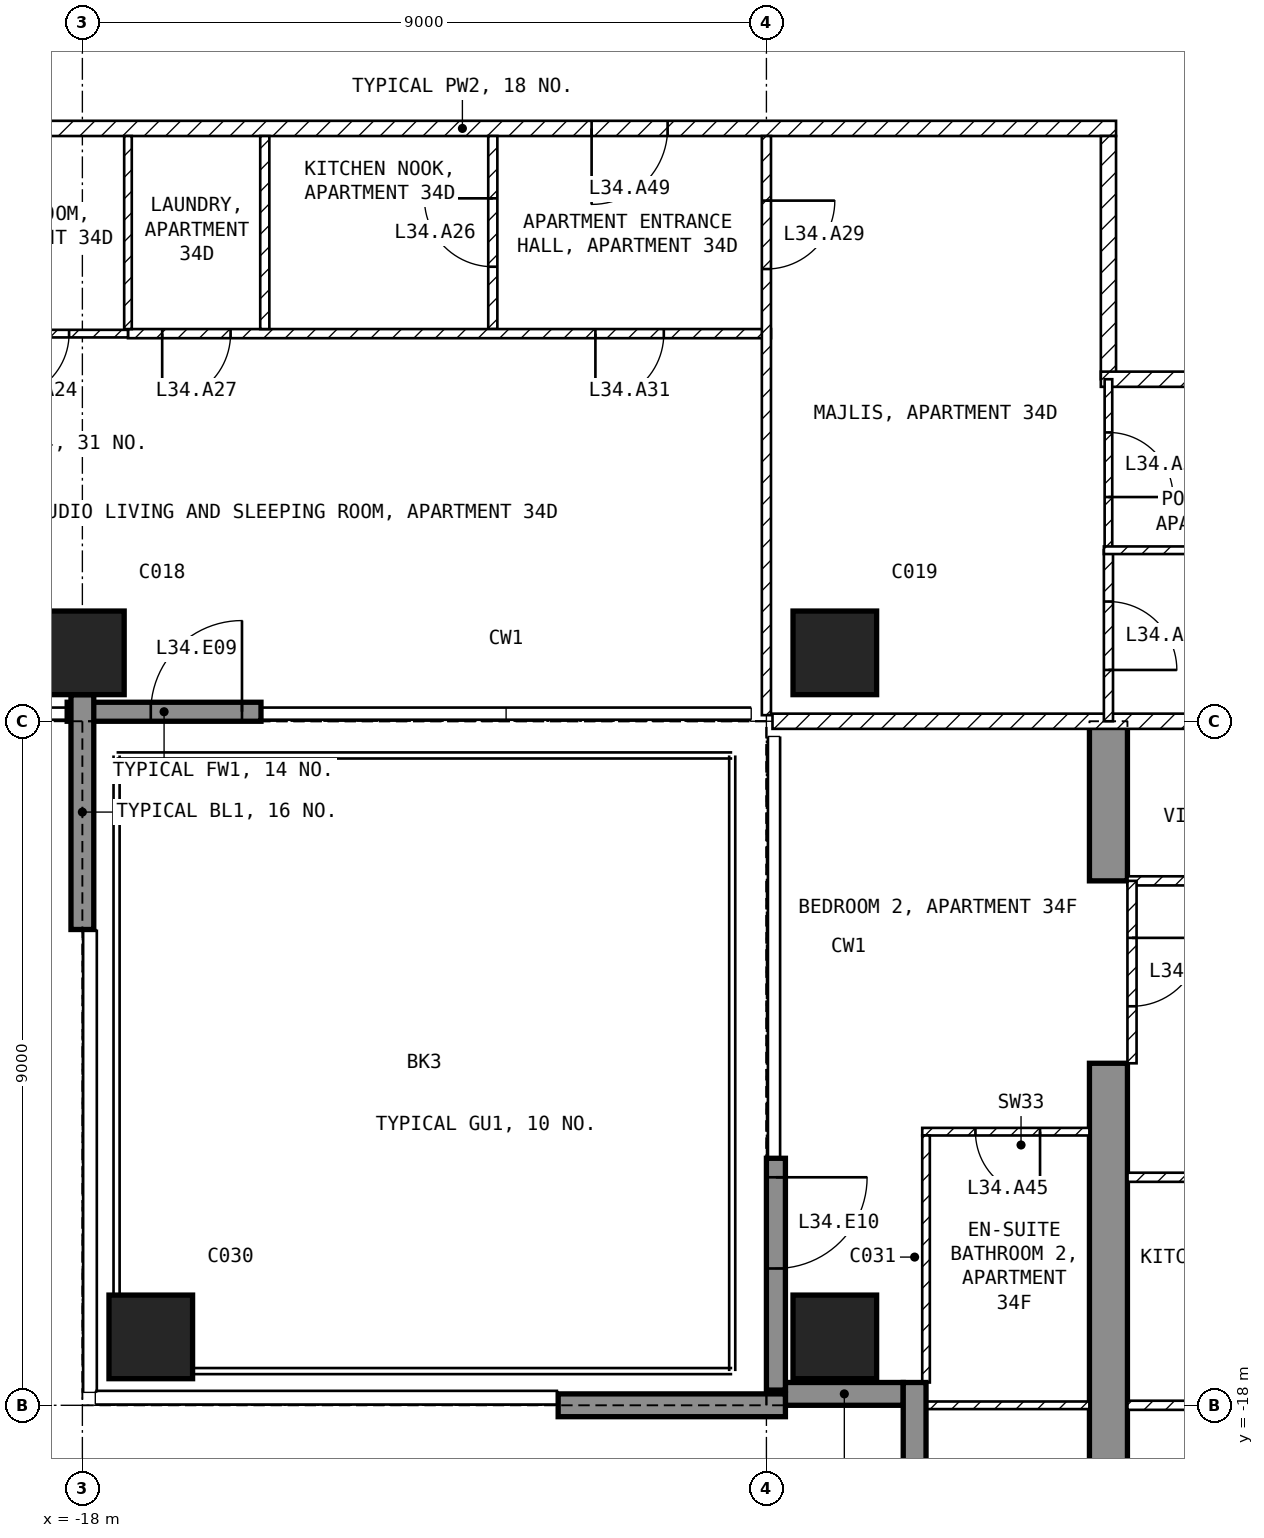
"""IFC4 building model, lengths in metres.
Left out: names, types, materials, properties, quantities, classifications, styles, units other than length and angle.
Written with IfcOpenShell. Run it as: python <this file> out.ifc"""

import sys

from ifc_helpers import new_model, si_unit, direction, frame, frame_2d, origin, origin_2d, place, context, subcontext, project, spatial, polyline, rectangle, outline, extrude, element, fill, save


model = new_model("IFC4")
c1 = context("Model", 3, precision=1e-05, world=origin(), true_north=direction((0.0, 1.0)))
c2 = subcontext(c1, "Body", "Model", "MODEL_VIEW")
j1 = project(units=[si_unit("LENGTHUNIT", "METRE"), si_unit("PLANEANGLEUNIT", "RADIAN")], contexts=[c1])
p1 = place(None, origin())
s1 = spatial("IfcSite", under=j1, at=p1, CompositionType="ELEMENT")
p2 = place(p1, origin())
s2 = spatial("IfcBuilding", under=s1, at=p2, CompositionType="ELEMENT")
p3 = place(p2, frame((0.0, 0.0, 140.9)))
s3 = spatial("IfcBuildingStorey", under=s2, at=p3, CompositionType="ELEMENT", Elevation=140.9)
for number, where, z_axis, x_axis in (
    (1, (-18.0, -8.1, -0.25), (0.0, 0.0, 1.0), (1.0, 0.0, 0.0)),
    (2, (-8.1, -17.1, -0.25), (0.0, 0.0, 1.0), (1.0, 0.0, 0.0)),
    (3, (-8.1, -8.1, -0.25), (0.0, 0.0, 1.0), (1.0, 0.0, 0.0)),
    (4, (-17.1, -17.1, -0.25), (0.0, 0.0, 1.0), (1.0, 0.0, 0.0)),
):
    element("IfcColumn", number, at=place(p3, frame(where, z_axis=z_axis, x_axis=x_axis)), inside=s3, PredefinedType="COLUMN", context=c2, shape_type="SweptSolid", body=[
        extrude(rectangle(XDim=1.1, YDim=1.1, at=origin_2d()), origin(), (0.0, 0.0, 1.0), 3.5),
    ])
p4 = place(p3, frame((-4.75, -20.15, -0.25), z_axis=(1.0, 0.0, 0.0), x_axis=(0.0, 1.0, 0.0)))
e5 = element("IfcWall", 5, at=p4, inside=s3, PredefinedType="SHEAR", context=c2, shape_type="SweptSolid", body=[
    extrude(outline(polyline([(0.0, 0.0), (6.65, 0.0), (6.65, 2.65), (9.05, 2.65), (9.05, 0.0), (11.15, 0.0), (11.15, 3.5), (0.0, 3.5), (0.0, 0.0)])), origin(), (0.0, 0.0, 1.0), 0.5),
])
p5 = place(p3, frame((-18.2, -8.875, 0.0), z_axis=(0.0, 0.0, 1.0), x_axis=(1.0, 0.0, 0.0)))
e6 = element("IfcWall", 6, at=p5, inside=s3, PredefinedType="SOLIDWALL", context=c2, shape_type="SweptSolid", body=[
    extrude(rectangle(XDim=2.55, YDim=0.25, at=frame_2d((1.275, 0.0))), origin(), (0.0, 0.0, 1.0), 3.25),
])
p6 = place(p5, frame((1.1, 0.0, 0.0)))
e7 = element("IfcOpeningElement", 7, at=p6, cuts=e6, PredefinedType="OPENING", context=c2, shape_type="SweptSolid", body=[
    extrude(rectangle(XDim=1.2, YDim=2.4, at=frame_2d((0.6, 1.2))), frame((0.0, 0.135, 0.0), z_axis=(0.0, -1.0, 0.0), x_axis=(1.0, 0.0, 0.0)), (0.0, 0.0, 1.0), 0.27),
])
p7 = place(p3, frame((-8.875, -14.75, 0.0), z_axis=(0.0, 0.0, 1.0), x_axis=(0.0, -1.0, 0.0)))
e8 = element("IfcWall", 8, at=p7, inside=s3, PredefinedType="SOLIDWALL", context=c2, shape_type="SweptSolid", body=[
    extrude(rectangle(XDim=3.05, YDim=0.25, at=frame_2d((1.525, 0.0))), origin(), (0.0, 0.0, 1.0), 3.25),
])
p8 = place(p7, frame((0.25, 0.0, 0.0)))
e9 = element("IfcOpeningElement", 9, at=p8, cuts=e8, PredefinedType="OPENING", context=c2, shape_type="SweptSolid", body=[
    extrude(rectangle(XDim=1.2, YDim=2.4, at=frame_2d((0.6, 1.2))), frame((0.0, 0.135, 0.0), z_axis=(0.0, -1.0, 0.0), x_axis=(1.0, 0.0, 0.0)), (0.0, 0.0, 1.0), 0.27),
])
p9 = place(p3, frame((-8.75, -17.85, 0.0), z_axis=(0.0, 0.0, 1.0), x_axis=(1.0, 0.0, 0.0)))
e10 = element("IfcWall", 10, at=p9, inside=s3, PredefinedType="SOLIDWALL", context=c2, shape_type="SweptSolid", body=[
    extrude(rectangle(XDim=1.55, YDim=0.3, at=frame_2d((0.775, 0.0))), origin(), (0.0, 0.0, 1.0), 3.25),
])
p10 = place(p3, frame((-7.05, -17.7, 0.0), z_axis=(0.0, 0.0, 1.0), x_axis=(0.0, -1.0, 0.0)))
e11 = element("IfcWall", 11, at=p10, inside=s3, PredefinedType="SOLIDWALL", context=c2, shape_type="SweptSolid", body=[
    extrude(rectangle(XDim=1.8, YDim=0.3, at=frame_2d((0.9, 0.0))), origin(), (0.0, 0.0, 1.0), 3.25),
])
p11 = place(p3, frame((-18.0, -8.65, 0.0), z_axis=(0.0, 0.0, 1.0), x_axis=(0.0, -1.0, 0.0)))
e12 = element("IfcWall", 12, at=p11, inside=s3, PredefinedType="SOLIDWALL", context=c2, shape_type="SweptSolid", body=[
    extrude(rectangle(XDim=3.09, YDim=0.3, at=frame_2d((1.545, 0.0))), origin(), (0.0, 0.0, 1.0), 3.25),
])
p12 = place(p3, frame((-8.75, -18.0, 0.0), z_axis=(0.0, 0.0, 1.0), x_axis=(-1.0, 0.0, 0.0)))
e13 = element("IfcWall", 13, at=p12, inside=s3, PredefinedType="SOLIDWALL", context=c2, shape_type="SweptSolid", body=[
    extrude(rectangle(XDim=2.99, YDim=0.3, at=frame_2d((1.495, 0.0))), origin(), (0.0, 0.0, 1.0), 3.25),
])
p13 = place(p3, frame((-4.4, -1.2, 0.0), z_axis=(0.0, 0.0, 1.0), x_axis=(-1.0, 0.0, 0.0)))
e14 = element("IfcWall", 14, at=p13, inside=s3, PredefinedType="PARTITIONING", context=c2, shape_type="SweptSolid", body=[
    extrude(rectangle(XDim=17.2, YDim=0.2, at=frame_2d((8.6, 0.0))), origin(), (0.0, 0.0, 1.0), 3.25),
])
p14 = place(p13, frame((5.9, 0.0, 0.0)))
e15 = element("IfcOpeningElement", 15, at=p14, cuts=e14, PredefinedType="OPENING", context=c2, shape_type="SweptSolid", body=[
    extrude(rectangle(XDim=1.0, YDim=2.1, at=frame_2d((0.5, 1.05))), frame((0.0, 0.11, 0.0), z_axis=(0.0, -1.0, 0.0), x_axis=(1.0, 0.0, 0.0)), (0.0, 0.0, 1.0), 0.22),
])
p15 = place(p3, frame((-4.5, -4.5, 0.0), z_axis=(0.0, 0.0, 1.0), x_axis=(0.0, 1.0, 0.0)))
e16 = element("IfcWall", 16, at=p15, inside=s3, PredefinedType="PARTITIONING", context=c2, shape_type="SweptSolid", body=[
    extrude(rectangle(XDim=3.2, YDim=0.2, at=frame_2d((1.6, 0.0))), origin(), (0.0, 0.0, 1.0), 3.25),
])
p16 = place(p3, frame((-1.1, -4.5, 0.0), z_axis=(0.0, 0.0, 1.0), x_axis=(-1.0, 0.0, 0.0)))
e17 = element("IfcWall", 17, at=p16, inside=s3, PredefinedType="PARTITIONING", context=c2, shape_type="SweptSolid", body=[
    extrude(rectangle(XDim=3.5, YDim=0.2, at=frame_2d((1.75, 0.0))), origin(), (0.0, 0.0, 1.0), 3.25),
])
p17 = place(p3, frame((8.92, -9.0, 0.0), z_axis=(0.0, 0.0, 1.0), x_axis=(-1.0, 0.0, 0.0)))
e18 = element("IfcWall", 18, at=p17, inside=s3, PredefinedType="PARTITIONING", context=c2, shape_type="SweptSolid", body=[
    extrude(rectangle(XDim=17.84, YDim=0.2, at=frame_2d((8.92, 0.0))), origin(), (0.0, 0.0, 1.0), 3.25),
])
p18 = place(p17, frame((8.42, 0.0, 0.0)))
e19 = element("IfcOpeningElement", 19, at=p18, cuts=e18, PredefinedType="OPENING", context=c2, shape_type="SweptSolid", body=[
    extrude(rectangle(XDim=1.0, YDim=2.1, at=frame_2d((0.5, 1.05))), frame((0.0, 0.11, 0.0), z_axis=(0.0, -1.0, 0.0), x_axis=(1.0, 0.0, 0.0)), (0.0, 0.0, 1.0), 0.22),
])
p19 = place(p3, frame((-12.6, -3.84, 0.0), z_axis=(0.0, 0.0, 1.0), x_axis=(0.0, 1.0, 0.0)))
e20 = element("IfcWall", 20, at=p19, inside=s3, PredefinedType="PARTITIONING", context=c2, shape_type="SweptSolid", body=[
    extrude(rectangle(XDim=2.54, YDim=0.12, at=frame_2d((1.27, 0.0))), origin(), (0.0, 0.0, 1.0), 3.25),
])
p20 = place(p19, frame((0.82, 0.0, 0.0)))
e21 = element("IfcOpeningElement", 21, at=p20, cuts=e20, PredefinedType="OPENING", context=c2, shape_type="SweptSolid", body=[
    extrude(rectangle(XDim=0.9, YDim=2.1, at=frame_2d((0.45, 1.05))), frame((0.0, 0.07, 0.0), z_axis=(0.0, -1.0, 0.0), x_axis=(1.0, 0.0, 0.0)), (0.0, 0.0, 1.0), 0.14),
])
p21 = place(p3, frame((-8.94, -3.9, 0.0), z_axis=(0.0, 0.0, 1.0), x_axis=(-1.0, 0.0, 0.0)))
e22 = element("IfcWall", 22, at=p21, inside=s3, PredefinedType="PARTITIONING", context=c2, shape_type="SweptSolid", body=[
    extrude(rectangle(XDim=8.46, YDim=0.12, at=frame_2d((4.23, 0.0))), origin(), (0.0, 0.0, 1.0), 3.25),
])
p22 = place(p21, frame((7.11, 0.0, 0.0)))
e23 = element("IfcOpeningElement", 23, at=p22, cuts=e22, PredefinedType="OPENING", context=c2, shape_type="SweptSolid", body=[
    extrude(rectangle(XDim=0.9, YDim=2.1, at=frame_2d((0.45, 1.05))), frame((0.0, 0.07, 0.0), z_axis=(0.0, -1.0, 0.0), x_axis=(1.0, 0.0, 0.0)), (0.0, 0.0, 1.0), 0.14),
])
p23 = place(p21, frame((1.41, 0.0, 0.0)))
e24 = element("IfcOpeningElement", 24, at=p23, cuts=e22, PredefinedType="OPENING", context=c2, shape_type="SweptSolid", body=[
    extrude(rectangle(XDim=0.9, YDim=2.1, at=frame_2d((0.45, 1.05))), frame((0.0, 0.07, 0.0), z_axis=(0.0, -1.0, 0.0), x_axis=(1.0, 0.0, 0.0)), (0.0, 0.0, 1.0), 0.14),
])
p24 = place(p3, frame((-9.0, -1.3, 0.0), z_axis=(0.0, 0.0, 1.0), x_axis=(0.0, -1.0, 0.0)))
e25 = element("IfcWall", 25, at=p24, inside=s3, PredefinedType="PARTITIONING", context=c2, shape_type="SweptSolid", body=[
    extrude(rectangle(XDim=7.62, YDim=0.12, at=frame_2d((3.81, 0.0))), origin(), (0.0, 0.0, 1.0), 3.25),
])
p25 = place(p24, frame((0.85, 0.0, 0.0)))
e26 = element("IfcOpeningElement", 26, at=p25, cuts=e25, PredefinedType="OPENING", context=c2, shape_type="SweptSolid", body=[
    extrude(rectangle(XDim=0.9, YDim=2.1, at=frame_2d((0.45, 1.05))), frame((0.0, 0.07, 0.0), z_axis=(0.0, -1.0, 0.0), x_axis=(1.0, 0.0, 0.0)), (0.0, 0.0, 1.0), 0.14),
])
p26 = place(p3, frame((-15.6, -3.84, 0.0), z_axis=(0.0, 0.0, 1.0), x_axis=(0.0, 1.0, 0.0)))
e27 = element("IfcWall", 27, at=p26, inside=s3, PredefinedType="PARTITIONING", context=c2, shape_type="SweptSolid", body=[
    extrude(rectangle(XDim=2.54, YDim=0.12, at=frame_2d((1.27, 0.0))), origin(), (0.0, 0.0, 1.0), 3.25),
])
p27 = place(p3, frame((-17.4, -3.84, 0.0), z_axis=(0.0, 0.0, 1.0), x_axis=(0.0, 1.0, 0.0)))
e28 = element("IfcWall", 28, at=p27, inside=s3, PredefinedType="PARTITIONING", context=c2, shape_type="SweptSolid", body=[
    extrude(rectangle(XDim=2.54, YDim=0.1, at=frame_2d((1.27, 0.0))), origin(), (0.0, 0.0, 1.0), 3.25),
])
p28 = place(p3, frame((-17.4, -3.9, 0.0), z_axis=(0.0, 0.0, 1.0), x_axis=(-1.0, 0.0, 0.0)))
e29 = element("IfcWall", 29, at=p28, inside=s3, PredefinedType="PARTITIONING", context=c2, shape_type="SweptSolid", body=[
    extrude(rectangle(XDim=2.4, YDim=0.1, at=frame_2d((1.2, 0.0))), origin(), (0.0, 0.0, 1.0), 3.25),
])
p29 = place(p28, frame((0.775, 0.0, 0.0)))
e30 = element("IfcOpeningElement", 30, at=p29, cuts=e29, PredefinedType="OPENING", context=c2, shape_type="SweptSolid", body=[
    extrude(rectangle(XDim=0.85, YDim=2.1, at=frame_2d((0.425, 1.05))), frame((0.0, 0.06, 0.0), z_axis=(0.0, -1.0, 0.0), x_axis=(1.0, 0.0, 0.0)), (0.0, 0.0, 1.0), 0.12),
])
p30 = place(p3, frame((-4.5, -4.5, 0.0), z_axis=(0.0, 0.0, 1.0), x_axis=(0.0, -1.0, 0.0)))
e31 = element("IfcWall", 31, at=p30, inside=s3, PredefinedType="PARTITIONING", context=c2, shape_type="SweptSolid", body=[
    extrude(rectangle(XDim=2.25, YDim=0.1, at=frame_2d((1.125, 0.0))), origin(), (0.0, 0.0, 1.0), 3.25),
])
p31 = place(p30, frame((0.7, 0.0, 0.0)))
e32 = element("IfcOpeningElement", 32, at=p31, cuts=e31, PredefinedType="OPENING", context=c2, shape_type="SweptSolid", body=[
    extrude(rectangle(XDim=0.85, YDim=2.1, at=frame_2d((0.425, 1.05))), frame((0.0, 0.06, 0.0), z_axis=(0.0, -1.0, 0.0), x_axis=(1.0, 0.0, 0.0)), (0.0, 0.0, 1.0), 0.12),
])
p32 = place(p3, frame((-4.5, -6.75, 0.0), z_axis=(0.0, 0.0, 1.0), x_axis=(0.0, -1.0, 0.0)))
e33 = element("IfcWall", 33, at=p32, inside=s3, PredefinedType="PARTITIONING", context=c2, shape_type="SweptSolid", body=[
    extrude(rectangle(XDim=2.25, YDim=0.12, at=frame_2d((1.125, 0.0))), origin(), (0.0, 0.0, 1.0), 3.25),
])
p33 = place(p32, frame((0.675, 0.0, 0.0)))
e34 = element("IfcOpeningElement", 34, at=p33, cuts=e33, PredefinedType="OPENING", context=c2, shape_type="SweptSolid", body=[
    extrude(rectangle(XDim=0.9, YDim=2.1, at=frame_2d((0.45, 1.05))), frame((0.0, 0.07, 0.0), z_axis=(0.0, -1.0, 0.0), x_axis=(1.0, 0.0, 0.0)), (0.0, 0.0, 1.0), 0.14),
])
p34 = place(p3, frame((-1.1, -6.75, 0.0), z_axis=(0.0, 0.0, 1.0), x_axis=(-1.0, 0.0, 0.0)))
e35 = element("IfcWall", 35, at=p34, inside=s3, PredefinedType="PARTITIONING", context=c2, shape_type="SweptSolid", body=[
    extrude(rectangle(XDim=3.46, YDim=0.1, at=frame_2d((1.73, 0.0))), origin(), (0.0, 0.0, 1.0), 3.25),
])
p35 = place(p3, frame((2.1, -11.1, 0.0), z_axis=(0.0, 0.0, 1.0), x_axis=(-1.0, 0.0, 0.0)))
e36 = element("IfcWall", 36, at=p35, inside=s3, PredefinedType="PARTITIONING", context=c2, shape_type="SweptSolid", body=[
    extrude(rectangle(XDim=6.35, YDim=0.12, at=frame_2d((3.175, 0.0))), origin(), (0.0, 0.0, 1.0), 3.25),
])
p36 = place(p35, frame((2.725, 0.0, 0.0)))
e37 = element("IfcOpeningElement", 37, at=p36, cuts=e36, PredefinedType="OPENING", context=c2, shape_type="SweptSolid", body=[
    extrude(rectangle(XDim=0.9, YDim=2.1, at=frame_2d((0.45, 1.05))), frame((0.0, 0.07, 0.0), z_axis=(0.0, -1.0, 0.0), x_axis=(1.0, 0.0, 0.0)), (0.0, 0.0, 1.0), 0.14),
])
p37 = place(p3, frame((-0.44, -15.0, 0.0), z_axis=(0.0, 0.0, 1.0), x_axis=(-1.0, 0.0, 0.0)))
e38 = element("IfcWall", 38, at=p37, inside=s3, PredefinedType="PARTITIONING", context=c2, shape_type="SweptSolid", body=[
    extrude(rectangle(XDim=3.81, YDim=0.12, at=frame_2d((1.905, 0.0))), origin(), (0.0, 0.0, 1.0), 3.25),
])
p38 = place(p3, frame((4.25, -18.0, 0.0), z_axis=(0.0, 0.0, 1.0), x_axis=(-1.0, 0.0, 0.0)))
e39 = element("IfcWall", 39, at=p38, inside=s3, PredefinedType="PARTITIONING", context=c2, shape_type="SweptSolid", body=[
    extrude(rectangle(XDim=8.5, YDim=0.12, at=frame_2d((4.25, 0.0))), origin(), (0.0, 0.0, 1.0), 3.25),
])
p39 = place(p38, frame((1.925, 0.0, 0.0)))
e40 = element("IfcOpeningElement", 40, at=p39, cuts=e39, PredefinedType="OPENING", context=c2, shape_type="SweptSolid", body=[
    extrude(rectangle(XDim=0.9, YDim=2.1, at=frame_2d((0.45, 1.05))), frame((0.0, 0.07, 0.0), z_axis=(0.0, -1.0, 0.0), x_axis=(1.0, 0.0, 0.0)), (0.0, 0.0, 1.0), 0.14),
])
p40 = place(p3, frame((-4.75, -14.4, 0.0), z_axis=(0.0, 0.0, 1.0), x_axis=(-1.0, 0.0, 0.0)))
e41 = element("IfcWall", 41, at=p40, inside=s3, PredefinedType="PARTITIONING", context=c2, shape_type="SweptSolid", body=[
    extrude(rectangle(XDim=2.2, YDim=0.1, at=frame_2d((1.1, 0.0))), origin(), (0.0, 0.0, 1.0), 3.25),
])
p41 = place(p40, frame((0.65, 0.0, 0.0)))
e42 = element("IfcOpeningElement", 42, at=p41, cuts=e41, PredefinedType="OPENING", context=c2, shape_type="SweptSolid", body=[
    extrude(rectangle(XDim=0.85, YDim=2.1, at=frame_2d((0.425, 1.05))), frame((0.0, 0.06, 0.0), z_axis=(0.0, -1.0, 0.0), x_axis=(1.0, 0.0, 0.0)), (0.0, 0.0, 1.0), 0.12),
])
p42 = place(p3, frame((-6.9, -14.45, 0.0), z_axis=(0.0, 0.0, 1.0), x_axis=(0.0, -1.0, 0.0)))
e43 = element("IfcWall", 43, at=p42, inside=s3, PredefinedType="PARTITIONING", context=c2, shape_type="SweptSolid", body=[
    extrude(rectangle(XDim=3.25, YDim=0.1, at=frame_2d((1.625, 0.0))), origin(), (0.0, 0.0, 1.0), 3.25),
])
p43 = place(p3, frame((-4.75, -18.0, 0.0), z_axis=(0.0, 0.0, 1.0), x_axis=(-1.0, 0.0, 0.0)))
e44 = element("IfcWall", 44, at=p43, inside=s3, PredefinedType="PARTITIONING", context=c2, shape_type="SweptSolid", body=[
    extrude(rectangle(XDim=2.37, YDim=0.1, at=frame_2d((1.185, 0.0))), origin(), (0.0, 0.0, 1.0), 3.25),
])
p44 = place(p3, frame((-4.19, -11.1, 0.0), z_axis=(0.0, 0.0, 1.0), x_axis=(0.0, -1.0, 0.0)))
e45 = element("IfcWall", 45, at=p44, inside=s3, PredefinedType="PARTITIONING", context=c2, shape_type="SweptSolid", body=[
    extrude(rectangle(XDim=2.4, YDim=0.12, at=frame_2d((1.2, 0.0))), origin(), (0.0, 0.0, 1.0), 2.4),
])
p45 = place(p44, frame((0.75, 0.0, 0.0)))
e46 = element("IfcOpeningElement", 46, at=p45, cuts=e45, PredefinedType="OPENING", context=c2, shape_type="SweptSolid", body=[
    extrude(rectangle(XDim=0.9, YDim=2.1, at=frame_2d((0.45, 1.05))), frame((0.0, 0.07, 0.0), z_axis=(0.0, -1.0, 0.0), x_axis=(1.0, 0.0, 0.0)), (0.0, 0.0, 1.0), 0.14),
])
p46 = place(p6, origin())
e47 = element("IfcDoor", 47, at=p46, inside=s3, OperationType="SINGLE_SWING_RIGHT", PredefinedType="DOOR", context=c2, shape_type="SweptSolid", body=[
    extrude(rectangle(XDim=1.2, YDim=2.4, at=frame_2d((0.6, 1.2))), frame((0.0, 0.025, 0.0), z_axis=(0.0, -1.0, 0.0), x_axis=(1.0, 0.0, 0.0)), (0.0, 0.0, 1.0), 0.05),
])
fill(e7, e47)
p47 = place(p8, origin())
e48 = element("IfcDoor", 48, at=p47, inside=s3, OperationType="SINGLE_SWING_LEFT", PredefinedType="DOOR", context=c2, shape_type="SweptSolid", body=[
    extrude(rectangle(XDim=1.2, YDim=2.4, at=frame_2d((0.6, 1.2))), frame((0.0, 0.025, 0.0), z_axis=(0.0, -1.0, 0.0), x_axis=(1.0, 0.0, 0.0)), (0.0, 0.0, 1.0), 0.05),
])
fill(e9, e48)
p48 = place(p29, origin())
e49 = element("IfcDoor", 49, at=p48, inside=s3, OperationType="SINGLE_SWING_RIGHT", PredefinedType="DOOR", context=c2, shape_type="SweptSolid", body=[
    extrude(rectangle(XDim=0.85, YDim=2.1, at=frame_2d((0.425, 1.05))), frame((0.0, 0.025, 0.0), z_axis=(0.0, -1.0, 0.0), x_axis=(1.0, 0.0, 0.0)), (0.0, 0.0, 1.0), 0.05),
])
fill(e30, e49)
p49 = place(p20, origin())
e50 = element("IfcDoor", 50, at=p49, inside=s3, OperationType="SINGLE_SWING_RIGHT", PredefinedType="DOOR", context=c2, shape_type="SweptSolid", body=[
    extrude(rectangle(XDim=0.9, YDim=2.1, at=frame_2d((0.45, 1.05))), frame((0.0, 0.025, 0.0), z_axis=(0.0, -1.0, 0.0), x_axis=(1.0, 0.0, 0.0)), (0.0, 0.0, 1.0), 0.05),
])
fill(e21, e50)
p50 = place(p22, origin())
e51 = element("IfcDoor", 51, at=p50, inside=s3, OperationType="SINGLE_SWING_RIGHT", PredefinedType="DOOR", context=c2, shape_type="SweptSolid", body=[
    extrude(rectangle(XDim=0.9, YDim=2.1, at=frame_2d((0.45, 1.05))), frame((0.0, 0.025, 0.0), z_axis=(0.0, -1.0, 0.0), x_axis=(1.0, 0.0, 0.0)), (0.0, 0.0, 1.0), 0.05),
])
fill(e23, e51)
p51 = place(p33, origin())
e52 = element("IfcDoor", 52, at=p51, inside=s3, OperationType="SINGLE_SWING_RIGHT", PredefinedType="DOOR", context=c2, shape_type="SweptSolid", body=[
    extrude(rectangle(XDim=0.9, YDim=2.1, at=frame_2d((0.45, 1.05))), frame((0.0, 0.025, 0.0), z_axis=(0.0, -1.0, 0.0), x_axis=(1.0, 0.0, 0.0)), (0.0, 0.0, 1.0), 0.05),
])
fill(e34, e52)
p52 = place(p25, origin())
e53 = element("IfcDoor", 53, at=p52, inside=s3, OperationType="SINGLE_SWING_LEFT", PredefinedType="DOOR", context=c2, shape_type="SweptSolid", body=[
    extrude(rectangle(XDim=0.9, YDim=2.1, at=frame_2d((0.45, 1.05))), frame((0.0, 0.025, 0.0), z_axis=(0.0, -1.0, 0.0), x_axis=(1.0, 0.0, 0.0)), (0.0, 0.0, 1.0), 0.05),
])
fill(e26, e53)
p53 = place(p31, origin())
e54 = element("IfcDoor", 54, at=p53, inside=s3, OperationType="SINGLE_SWING_RIGHT", PredefinedType="DOOR", context=c2, shape_type="SweptSolid", body=[
    extrude(rectangle(XDim=0.85, YDim=2.1, at=frame_2d((0.425, 1.05))), frame((0.0, 0.025, 0.0), z_axis=(0.0, -1.0, 0.0), x_axis=(1.0, 0.0, 0.0)), (0.0, 0.0, 1.0), 0.05),
])
fill(e32, e54)
p54 = place(p23, origin())
e55 = element("IfcDoor", 55, at=p54, inside=s3, OperationType="SINGLE_SWING_RIGHT", PredefinedType="DOOR", context=c2, shape_type="SweptSolid", body=[
    extrude(rectangle(XDim=0.9, YDim=2.1, at=frame_2d((0.45, 1.05))), frame((0.0, 0.025, 0.0), z_axis=(0.0, -1.0, 0.0), x_axis=(1.0, 0.0, 0.0)), (0.0, 0.0, 1.0), 0.05),
])
fill(e24, e55)
p55 = place(p41, origin())
e56 = element("IfcDoor", 56, at=p55, inside=s3, OperationType="SINGLE_SWING_LEFT", PredefinedType="DOOR", context=c2, shape_type="SweptSolid", body=[
    extrude(rectangle(XDim=0.85, YDim=2.1, at=frame_2d((0.425, 1.05))), frame((0.0, 0.025, 0.0), z_axis=(0.0, -1.0, 0.0), x_axis=(1.0, 0.0, 0.0)), (0.0, 0.0, 1.0), 0.05),
])
fill(e42, e56)
p56 = place(p14, origin())
e57 = element("IfcDoor", 57, at=p56, inside=s3, OperationType="SINGLE_SWING_RIGHT", PredefinedType="DOOR", context=c2, shape_type="SweptSolid", body=[
    extrude(rectangle(XDim=1.0, YDim=2.1, at=frame_2d((0.5, 1.05))), frame((0.0, 0.025, 0.0), z_axis=(0.0, -1.0, 0.0), x_axis=(1.0, 0.0, 0.0)), (0.0, 0.0, 1.0), 0.05),
])
fill(e15, e57)
p57 = place(p45, origin())
e58 = element("IfcDoor", 58, at=p57, inside=s3, OperationType="SINGLE_SWING_LEFT", PredefinedType="DOOR", context=c2, shape_type="SweptSolid", body=[
    extrude(rectangle(XDim=0.9, YDim=2.1, at=frame_2d((0.45, 1.05))), frame((0.0, 0.025, 0.0), z_axis=(0.0, -1.0, 0.0), x_axis=(1.0, 0.0, 0.0)), (0.0, 0.0, 1.0), 0.05),
])
fill(e46, e58)
save(model, sys.argv[1])
